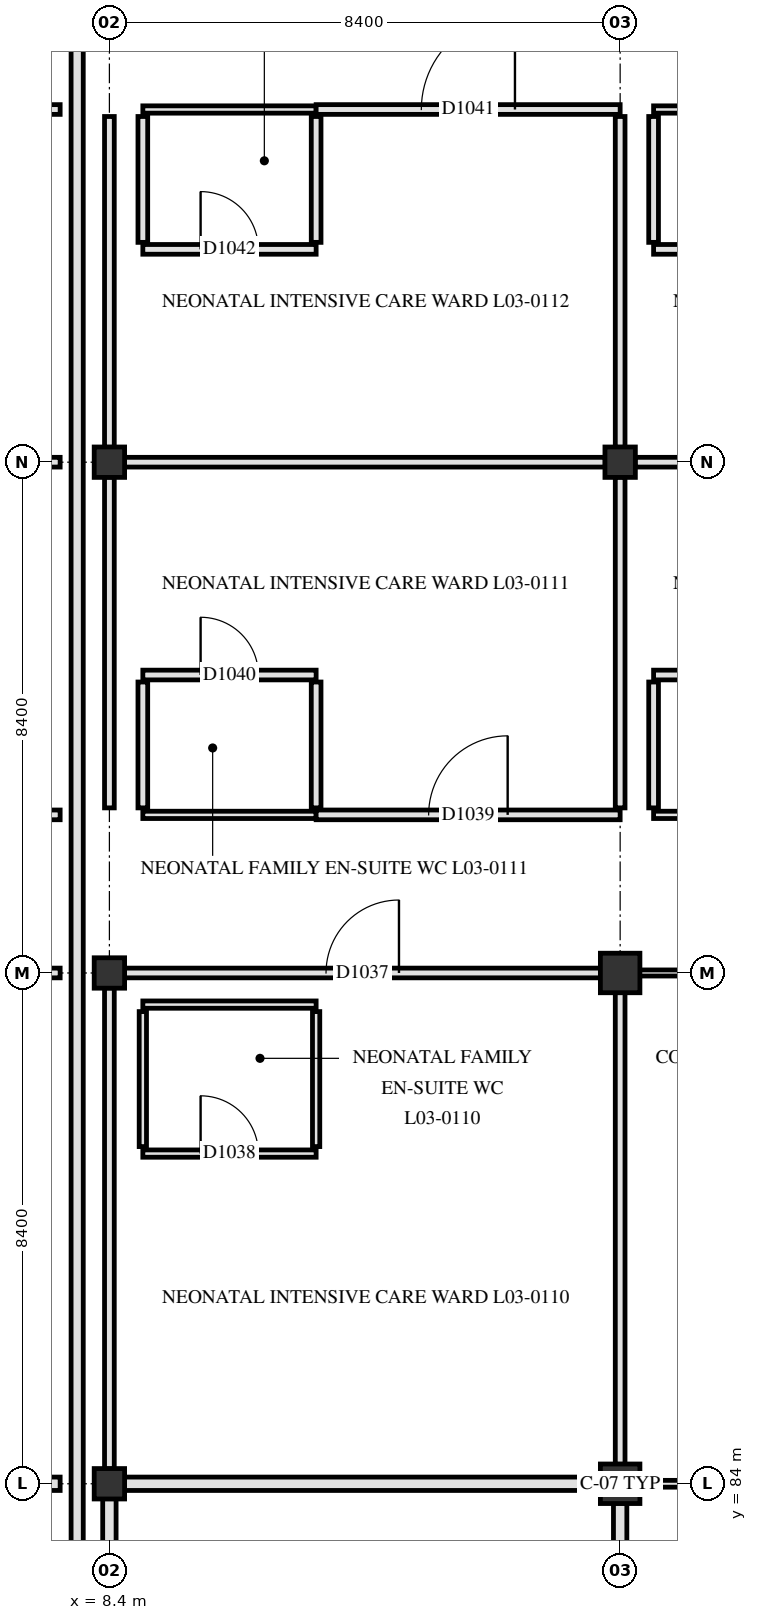
"""IFC4 building model, lengths in metres.
Left out: names, types, materials, properties, quantities, classifications, styles, units other than length and angle.
Written with IfcOpenShell. Run it as: python <this file> out.ifc"""

import sys

from ifc_helpers import new_model, si_unit, direction, frame, frame_2d, origin, origin_2d, place, context, subcontext, project, spatial, rectangle, circle, extrude, element, fill, save


model = new_model("IFC4")
c1 = context("Model", 3, precision=1e-05, world=origin(), true_north=direction((0.0, 1.0)))
c2 = subcontext(c1, "Body", "Model", "MODEL_VIEW")
j1 = project(units=[si_unit("LENGTHUNIT", "METRE"), si_unit("PLANEANGLEUNIT", "RADIAN")], contexts=[c1])
p1 = place(None, origin())
s1 = spatial("IfcSite", under=j1, at=p1, CompositionType="ELEMENT")
p2 = place(p1, origin())
s2 = spatial("IfcBuilding", under=s1, at=p2, CompositionType="ELEMENT")
p3 = place(p2, frame((0.0, 0.0, 14.4)))
s3 = spatial("IfcBuildingStorey", under=s2, at=p3, CompositionType="ELEMENT", Elevation=14.4)
for number, where, z_axis, x_axis in (
    (1, (8.4, 84.0, 0.0), (0.0, 0.0, 1.0), (1.0, 0.0, 0.0)),
    (2, (8.4, 92.4, 0.0), (0.0, 0.0, 1.0), (1.0, 0.0, 0.0)),
    (3, (8.4, 100.8, 0.0), (0.0, 0.0, 1.0), (1.0, 0.0, 0.0)),
):
    element("IfcColumn", number, at=place(p3, frame(where, z_axis=z_axis, x_axis=x_axis)), inside=s3, PredefinedType="COLUMN", context=c2, shape_type="SweptSolid", body=[
        extrude(rectangle(XDim=0.5, YDim=0.5, at=origin_2d()), origin(), (0.0, 0.0, 1.0), 4.2),
    ])
for number, where, z_axis, x_axis in (
    (4, (16.8, 84.0, 0.0), (0.0, 0.0, 1.0), (1.0, 0.0, 0.0)),
    (5, (16.8, 92.4, 0.0), (0.0, 0.0, 1.0), (1.0, 0.0, 0.0)),
):
    element("IfcColumn", number, at=place(p3, frame(where, z_axis=z_axis, x_axis=x_axis)), inside=s3, PredefinedType="COLUMN", context=c2, shape_type="SweptSolid", body=[
        extrude(circle(Radius=0.325, at=origin_2d()), origin(), (0.0, 0.0, 1.0), 4.2),
    ])
p4 = place(p3, frame((16.8, 100.8, 0.0), z_axis=(0.0, 0.0, 1.0), x_axis=(1.0, 0.0, 0.0)))
e6 = element("IfcColumn", 6, at=p4, inside=s3, PredefinedType="COLUMN", context=c2, shape_type="SweptSolid", body=[
    extrude(rectangle(XDim=0.5, YDim=0.5, at=origin_2d()), origin(), (0.0, 0.0, 1.0), 4.2),
])
p5 = place(p3, frame((7.87, 109.2, 4.18), z_axis=(0.0, 0.0, 1.0), x_axis=(0.0, -1.0, 0.0)))
e7 = element("IfcWall", 7, at=p5, inside=s3, PredefinedType="PARAPET", context=c2, shape_type="SweptSolid", body=[
    extrude(rectangle(XDim=50.4, YDim=0.2, at=frame_2d((25.2, 0.0))), origin(), (0.0, 0.0, 1.0), 1.17),
])
p6 = place(p3, frame((0.39, 84.0, 0.0), z_axis=(0.0, 0.0, 1.0), x_axis=(1.0, 0.0, 0.0)))
e8 = element("IfcWall", 8, at=p6, inside=s3, PredefinedType="PARTITIONING", context=c2, shape_type="SweptSolid", body=[
    extrude(rectangle(XDim=7.2, YDim=0.22, at=frame_2d((3.6, 0.0))), origin(), (0.0, 0.0, 1.0), 3.29),
])
p7 = place(p3, frame((8.645, 84.0, 0.0), z_axis=(0.0, 0.0, 1.0), x_axis=(1.0, 0.0, 0.0)))
e9 = element("IfcWall", 9, at=p7, inside=s3, PredefinedType="PARTITIONING", context=c2, shape_type="SweptSolid", body=[
    extrude(rectangle(XDim=7.835, YDim=0.22, at=frame_2d((3.917, 0.0))), origin(), (0.0, 0.0, 1.0), 3.28),
])
p8 = place(p3, frame((17.12, 84.0, 0.0), z_axis=(0.0, 0.0, 1.0), x_axis=(1.0, 0.0, 0.0)))
e10 = element("IfcWall", 10, at=p8, inside=s3, PredefinedType="PARTITIONING", context=c2, shape_type="SweptSolid", body=[
    extrude(rectangle(XDim=1.38, YDim=0.112, at=frame_2d((0.69, 0.0))), origin(), (0.0, 0.0, 1.0), 3.89),
])
p9 = place(p3, frame((8.95, 89.43, 0.0), z_axis=(0.0, 0.0, 1.0), x_axis=(1.0, 0.0, 0.0)))
e11 = element("IfcWall", 11, at=p9, inside=s3, PredefinedType="PARTITIONING", context=c2, shape_type="SweptSolid", body=[
    extrude(rectangle(XDim=2.85, YDim=0.12, at=frame_2d((1.425, 0.0))), origin(), (0.0, 0.0, 1.0), 3.89),
])
p10 = place(p9, frame((0.95, 0.0, 0.0)))
e12 = element("IfcOpeningElement", 12, at=p10, cuts=e11, PredefinedType="OPENING", context=c2, shape_type="SweptSolid", body=[
    extrude(rectangle(XDim=0.95, YDim=2.1, at=frame_2d((0.475, 1.05))), frame((0.0, 0.07, 0.0), z_axis=(0.0, -1.0, 0.0), x_axis=(1.0, 0.0, 0.0)), (0.0, 0.0, 1.0), 0.14),
])
p11 = place(p3, frame((8.95, 91.88, 0.0), z_axis=(0.0, 0.0, 1.0), x_axis=(1.0, 0.0, 0.0)))
e13 = element("IfcWall", 13, at=p11, inside=s3, PredefinedType="PARTITIONING", context=c2, shape_type="SweptSolid", body=[
    extrude(rectangle(XDim=2.85, YDim=0.12, at=frame_2d((1.425, 0.0))), origin(), (0.0, 0.0, 1.0), 3.89),
])
p12 = place(p3, frame((0.383, 92.4, 0.0), z_axis=(0.0, 0.0, 1.0), x_axis=(1.0, 0.0, 0.0)))
e14 = element("IfcWall", 14, at=p12, inside=s3, PredefinedType="PARTITIONING", context=c2, shape_type="SweptSolid", body=[
    extrude(rectangle(XDim=7.208, YDim=0.16, at=frame_2d((3.604, 0.0))), origin(), (0.0, 0.0, 1.0), 3.29),
])
p13 = place(p12, frame((3.949, 0.0, 0.0)))
e15 = element("IfcOpeningElement", 15, at=p13, cuts=e14, PredefinedType="OPENING", context=c2, shape_type="SweptSolid", body=[
    extrude(rectangle(XDim=1.4, YDim=2.2, at=frame_2d((0.7, 1.1))), frame((0.0, 0.09, 0.0), z_axis=(0.0, -1.0, 0.0), x_axis=(1.0, 0.0, 0.0)), (0.0, 0.0, 1.0), 0.18),
])
p14 = place(p3, frame((8.645, 92.4, 0.0), z_axis=(0.0, 0.0, 1.0), x_axis=(1.0, 0.0, 0.0)))
e16 = element("IfcWall", 16, at=p14, inside=s3, PredefinedType="PARTITIONING", context=c2, shape_type="SweptSolid", body=[
    extrude(rectangle(XDim=7.835, YDim=0.16, at=frame_2d((3.917, 0.0))), origin(), (0.0, 0.0, 1.0), 3.28),
])
p15 = place(p14, frame((3.317, 0.0, 0.0)))
e17 = element("IfcOpeningElement", 17, at=p15, cuts=e16, PredefinedType="OPENING", context=c2, shape_type="SweptSolid", body=[
    extrude(rectangle(XDim=1.2, YDim=2.15, at=frame_2d((0.6, 1.075))), frame((0.0, 0.09, 0.0), z_axis=(0.0, -1.0, 0.0), x_axis=(1.0, 0.0, 0.0)), (0.0, 0.0, 1.0), 0.18),
])
p16 = place(p3, frame((17.12, 92.4, 0.0), z_axis=(0.0, 0.0, 1.0), x_axis=(1.0, 0.0, 0.0)))
e18 = element("IfcWall", 18, at=p16, inside=s3, PredefinedType="PARTITIONING", context=c2, shape_type="SweptSolid", body=[
    extrude(rectangle(XDim=7.76, YDim=0.1, at=frame_2d((3.88, 0.0))), origin(), (0.0, 0.0, 1.0), 3.28),
])
p17 = place(p16, frame((3.22, 0.0, 0.0)))
e19 = element("IfcOpeningElement", 19, at=p17, cuts=e18, PredefinedType="OPENING", context=c2, shape_type="SweptSolid", body=[
    extrude(rectangle(XDim=1.32, YDim=2.18, at=frame_2d((0.66, 1.09))), frame((0.0, 0.06, 0.0), z_axis=(0.0, -1.0, 0.0), x_axis=(1.0, 0.0, 0.0)), (0.0, 0.0, 1.0), 0.12),
])
p18 = place(p3, frame((3.4, 95.0, 0.0), z_axis=(0.0, 0.0, 1.0), x_axis=(1.0, 0.0, 0.0)))
e20 = element("IfcWall", 20, at=p18, inside=s3, PredefinedType="PARTITIONING", context=c2, shape_type="SweptSolid", body=[
    extrude(rectangle(XDim=4.19, YDim=0.16, at=frame_2d((2.095, 0.0))), origin(), (0.0, 0.0, 1.0), 3.89),
])
p19 = place(p18, frame((1.37, 0.0, 0.0)))
e21 = element("IfcOpeningElement", 21, at=p19, cuts=e20, PredefinedType="OPENING", context=c2, shape_type="SweptSolid", body=[
    extrude(rectangle(XDim=1.45, YDim=2.2, at=frame_2d((0.725, 1.1))), frame((0.0, 0.09, 0.0), z_axis=(0.0, -1.0, 0.0), x_axis=(1.0, 0.0, 0.0)), (0.0, 0.0, 1.0), 0.18),
])
p20 = place(p3, frame((8.95, 95.0, 0.0), z_axis=(0.0, 0.0, 1.0), x_axis=(1.0, 0.0, 0.0)))
e22 = element("IfcWall", 22, at=p20, inside=s3, PredefinedType="PARTITIONING", context=c2, shape_type="SweptSolid", body=[
    extrude(rectangle(XDim=2.85, YDim=0.12, at=frame_2d((1.425, 0.0))), origin(), (0.0, 0.0, 1.0), 3.89),
])
p21 = place(p3, frame((11.8, 95.0, 0.0), z_axis=(0.0, 0.0, 1.0), x_axis=(1.0, 0.0, 0.0)))
e23 = element("IfcWall", 23, at=p21, inside=s3, PredefinedType="PARTITIONING", context=c2, shape_type="SweptSolid", body=[
    extrude(rectangle(XDim=5.0, YDim=0.16, at=frame_2d((2.5, 0.0))), origin(), (0.0, 0.0, 1.0), 3.33),
])
p22 = place(p21, frame((1.85, 0.0, 0.0)))
e24 = element("IfcOpeningElement", 24, at=p22, cuts=e23, PredefinedType="OPENING", context=c2, shape_type="SweptSolid", body=[
    extrude(rectangle(XDim=1.3, YDim=2.2, at=frame_2d((0.65, 1.1))), frame((0.0, 0.09, 0.0), z_axis=(0.0, -1.0, 0.0), x_axis=(1.0, 0.0, 0.0)), (0.0, 0.0, 1.0), 0.18),
])
p23 = place(p3, frame((17.35, 95.0, 0.0), z_axis=(0.0, 0.0, 1.0), x_axis=(1.0, 0.0, 0.0)))
e25 = element("IfcWall", 25, at=p23, inside=s3, PredefinedType="PARTITIONING", context=c2, shape_type="SweptSolid", body=[
    extrude(rectangle(XDim=2.85, YDim=0.12, at=frame_2d((1.425, 0.0))), origin(), (0.0, 0.0, 1.0), 3.89),
])
p24 = place(p3, frame((8.95, 97.3, 0.0), z_axis=(0.0, 0.0, 1.0), x_axis=(1.0, 0.0, 0.0)))
e26 = element("IfcWall", 26, at=p24, inside=s3, PredefinedType="PARTITIONING", context=c2, shape_type="SweptSolid", body=[
    extrude(rectangle(XDim=2.85, YDim=0.16, at=frame_2d((1.425, 0.0))), origin(), (0.0, 0.0, 1.0), 3.89),
])
p25 = place(p24, frame((0.95, 0.0, 0.0)))
e27 = element("IfcOpeningElement", 27, at=p25, cuts=e26, PredefinedType="OPENING", context=c2, shape_type="SweptSolid", body=[
    extrude(rectangle(XDim=0.95, YDim=2.1, at=frame_2d((0.475, 1.05))), frame((0.0, 0.09, 0.0), z_axis=(0.0, -1.0, 0.0), x_axis=(1.0, 0.0, 0.0)), (0.0, 0.0, 1.0), 0.18),
])
p26 = place(p3, frame((17.35, 97.3, 0.0), z_axis=(0.0, 0.0, 1.0), x_axis=(1.0, 0.0, 0.0)))
e28 = element("IfcWall", 28, at=p26, inside=s3, PredefinedType="PARTITIONING", context=c2, shape_type="SweptSolid", body=[
    extrude(rectangle(XDim=2.85, YDim=0.16, at=frame_2d((1.425, 0.0))), origin(), (0.0, 0.0, 1.0), 3.89),
])
p27 = place(p26, frame((0.95, 0.0, 0.0)))
e29 = element("IfcOpeningElement", 29, at=p27, cuts=e28, PredefinedType="OPENING", context=c2, shape_type="SweptSolid", body=[
    extrude(rectangle(XDim=0.95, YDim=2.1, at=frame_2d((0.475, 1.05))), frame((0.0, 0.09, 0.0), z_axis=(0.0, -1.0, 0.0), x_axis=(1.0, 0.0, 0.0)), (0.0, 0.0, 1.0), 0.18),
])
p28 = place(p3, frame((0.39, 100.8, 0.0), z_axis=(0.0, 0.0, 1.0), x_axis=(1.0, 0.0, 0.0)))
e30 = element("IfcWall", 30, at=p28, inside=s3, PredefinedType="PARTITIONING", context=c2, shape_type="SweptSolid", body=[
    extrude(rectangle(XDim=7.2, YDim=0.16, at=frame_2d((3.6, 0.0))), origin(), (0.0, 0.0, 1.0), 3.29),
])
p29 = place(p3, frame((8.645, 100.8, 0.0), z_axis=(0.0, 0.0, 1.0), x_axis=(1.0, 0.0, 0.0)))
e31 = element("IfcWall", 31, at=p29, inside=s3, PredefinedType="PARTITIONING", context=c2, shape_type="SweptSolid", body=[
    extrude(rectangle(XDim=7.91, YDim=0.16, at=frame_2d((3.955, 0.0))), origin(), (0.0, 0.0, 1.0), 3.28),
])
p30 = place(p3, frame((17.045, 100.8, 0.0), z_axis=(0.0, 0.0, 1.0), x_axis=(1.0, 0.0, 0.0)))
e32 = element("IfcWall", 32, at=p30, inside=s3, PredefinedType="PARTITIONING", context=c2, shape_type="SweptSolid", body=[
    extrude(rectangle(XDim=7.91, YDim=0.16, at=frame_2d((3.955, 0.0))), origin(), (0.0, 0.0, 1.0), 3.28),
])
p31 = place(p3, frame((8.95, 104.3, 0.0), z_axis=(0.0, 0.0, 1.0), x_axis=(1.0, 0.0, 0.0)))
e33 = element("IfcWall", 33, at=p31, inside=s3, PredefinedType="PARTITIONING", context=c2, shape_type="SweptSolid", body=[
    extrude(rectangle(XDim=2.85, YDim=0.16, at=frame_2d((1.425, 0.0))), origin(), (0.0, 0.0, 1.0), 3.89),
])
p32 = place(p31, frame((0.95, 0.0, 0.0)))
e34 = element("IfcOpeningElement", 34, at=p32, cuts=e33, PredefinedType="OPENING", context=c2, shape_type="SweptSolid", body=[
    extrude(rectangle(XDim=0.95, YDim=2.1, at=frame_2d((0.475, 1.05))), frame((0.0, 0.09, 0.0), z_axis=(0.0, -1.0, 0.0), x_axis=(1.0, 0.0, 0.0)), (0.0, 0.0, 1.0), 0.18),
])
p33 = place(p3, frame((17.35, 104.3, 0.0), z_axis=(0.0, 0.0, 1.0), x_axis=(1.0, 0.0, 0.0)))
e35 = element("IfcWall", 35, at=p33, inside=s3, PredefinedType="PARTITIONING", context=c2, shape_type="SweptSolid", body=[
    extrude(rectangle(XDim=2.85, YDim=0.16, at=frame_2d((1.425, 0.0))), origin(), (0.0, 0.0, 1.0), 3.89),
])
p34 = place(p33, frame((0.95, 0.0, 0.0)))
e36 = element("IfcOpeningElement", 36, at=p34, cuts=e35, PredefinedType="OPENING", context=c2, shape_type="SweptSolid", body=[
    extrude(rectangle(XDim=0.95, YDim=2.1, at=frame_2d((0.475, 1.05))), frame((0.0, 0.09, 0.0), z_axis=(0.0, -1.0, 0.0), x_axis=(1.0, 0.0, 0.0)), (0.0, 0.0, 1.0), 0.18),
])
p35 = place(p3, frame((3.4, 106.6, 0.0), z_axis=(0.0, 0.0, 1.0), x_axis=(1.0, 0.0, 0.0)))
e37 = element("IfcWall", 37, at=p35, inside=s3, PredefinedType="PARTITIONING", context=c2, shape_type="SweptSolid", body=[
    extrude(rectangle(XDim=4.19, YDim=0.16, at=frame_2d((2.095, 0.0))), origin(), (0.0, 0.0, 1.0), 3.89),
])
p36 = place(p35, frame((1.195, 0.0, 0.0)))
e38 = element("IfcOpeningElement", 38, at=p36, cuts=e37, PredefinedType="OPENING", context=c2, shape_type="SweptSolid", body=[
    extrude(rectangle(XDim=1.8, YDim=2.25, at=frame_2d((0.9, 1.125))), frame((0.0, 0.09, 0.0), z_axis=(0.0, -1.0, 0.0), x_axis=(1.0, 0.0, 0.0)), (0.0, 0.0, 1.0), 0.18),
])
p37 = place(p3, frame((8.95, 106.6, 0.0), z_axis=(0.0, 0.0, 1.0), x_axis=(1.0, 0.0, 0.0)))
e39 = element("IfcWall", 39, at=p37, inside=s3, PredefinedType="PARTITIONING", context=c2, shape_type="SweptSolid", body=[
    extrude(rectangle(XDim=2.85, YDim=0.12, at=frame_2d((1.425, 0.0))), origin(), (0.0, 0.0, 1.0), 3.89),
])
p38 = place(p3, frame((11.8, 106.6, 0.0), z_axis=(0.0, 0.0, 1.0), x_axis=(1.0, 0.0, 0.0)))
e40 = element("IfcWall", 40, at=p38, inside=s3, PredefinedType="PARTITIONING", context=c2, shape_type="SweptSolid", body=[
    extrude(rectangle(XDim=5.0, YDim=0.16, at=frame_2d((2.5, 0.0))), origin(), (0.0, 0.0, 1.0), 3.33),
])
p39 = place(p38, frame((1.73, 0.0, 0.0)))
e41 = element("IfcOpeningElement", 41, at=p39, cuts=e40, PredefinedType="OPENING", context=c2, shape_type="SweptSolid", body=[
    extrude(rectangle(XDim=1.54, YDim=2.24, at=frame_2d((0.77, 1.12))), frame((0.0, 0.09, 0.0), z_axis=(0.0, -1.0, 0.0), x_axis=(1.0, 0.0, 0.0)), (0.0, 0.0, 1.0), 0.18),
])
p40 = place(p3, frame((17.35, 106.6, 0.0), z_axis=(0.0, 0.0, 1.0), x_axis=(1.0, 0.0, 0.0)))
e42 = element("IfcWall", 42, at=p40, inside=s3, PredefinedType="PARTITIONING", context=c2, shape_type="SweptSolid", body=[
    extrude(rectangle(XDim=2.85, YDim=0.12, at=frame_2d((1.425, 0.0))), origin(), (0.0, 0.0, 1.0), 3.89),
])
p41 = place(p3, frame((8.4, 78.315, 0.0), z_axis=(0.0, 0.0, 1.0), x_axis=(0.0, 1.0, 0.0)))
e43 = element("IfcWall", 43, at=p41, inside=s3, PredefinedType="PARTITIONING", context=c2, shape_type="SweptSolid", body=[
    extrude(rectangle(XDim=5.44, YDim=0.22, at=frame_2d((2.72, 0.0))), origin(), (0.0, 0.0, 1.0), 3.33),
])
p42 = place(p3, frame((8.4, 84.245, 0.0), z_axis=(0.0, 0.0, 1.0), x_axis=(0.0, 1.0, 0.0)))
e44 = element("IfcWall", 44, at=p42, inside=s3, PredefinedType="PARTITIONING", context=c2, shape_type="SweptSolid", body=[
    extrude(rectangle(XDim=7.91, YDim=0.16, at=frame_2d((3.955, 0.0))), origin(), (0.0, 0.0, 1.0), 3.33),
])
p43 = place(p3, frame((8.4, 95.115, 0.0), z_axis=(0.0, 0.0, 1.0), x_axis=(0.0, 1.0, 0.0)))
e45 = element("IfcWall", 45, at=p43, inside=s3, PredefinedType="PARTITIONING", context=c2, shape_type="SweptSolid", body=[
    extrude(rectangle(XDim=5.44, YDim=0.16, at=frame_2d((2.72, 0.0))), origin(), (0.0, 0.0, 1.0), 3.33),
])
p44 = place(p3, frame((8.4, 101.045, 0.0), z_axis=(0.0, 0.0, 1.0), x_axis=(0.0, 1.0, 0.0)))
e46 = element("IfcWall", 46, at=p44, inside=s3, PredefinedType="PARTITIONING", context=c2, shape_type="SweptSolid", body=[
    extrude(rectangle(XDim=5.44, YDim=0.16, at=frame_2d((2.72, 0.0))), origin(), (0.0, 0.0, 1.0), 3.33),
])
p45 = place(p3, frame((8.95, 89.545, 0.0), z_axis=(0.0, 0.0, 1.0), x_axis=(0.0, 1.0, 0.0)))
e47 = element("IfcWall", 47, at=p45, inside=s3, PredefinedType="PARTITIONING", context=c2, shape_type="SweptSolid", body=[
    extrude(rectangle(XDim=2.22, YDim=0.12, at=frame_2d((1.11, 0.0))), origin(), (0.0, 0.0, 1.0), 3.89),
])
for number, where, z_axis, x_axis in (
    (48, (8.95, 95.115, 0.0), (0.0, 0.0, 1.0), (0.0, 1.0, 0.0)),
    (49, (8.95, 104.415, 0.0), (0.0, 0.0, 1.0), (0.0, 1.0, 0.0)),
):
    element("IfcWall", number, at=place(p3, frame(where, z_axis=z_axis, x_axis=x_axis)), inside=s3, PredefinedType="PARTITIONING", context=c2, shape_type="SweptSolid", body=[
        extrude(rectangle(XDim=2.07, YDim=0.16, at=frame_2d((1.035, 0.0))), origin(), (0.0, 0.0, 1.0), 3.89),
    ])
p46 = place(p3, frame((11.8, 89.545, 0.0), z_axis=(0.0, 0.0, 1.0), x_axis=(0.0, 1.0, 0.0)))
e50 = element("IfcWall", 50, at=p46, inside=s3, PredefinedType="PARTITIONING", context=c2, shape_type="SweptSolid", body=[
    extrude(rectangle(XDim=2.22, YDim=0.12, at=frame_2d((1.11, 0.0))), origin(), (0.0, 0.0, 1.0), 3.89),
])
for number, where, z_axis, x_axis in (
    (51, (11.8, 95.115, 0.0), (0.0, 0.0, 1.0), (0.0, 1.0, 0.0)),
    (52, (11.8, 104.415, 0.0), (0.0, 0.0, 1.0), (0.0, 1.0, 0.0)),
):
    element("IfcWall", number, at=place(p3, frame(where, z_axis=z_axis, x_axis=x_axis)), inside=s3, PredefinedType="PARTITIONING", context=c2, shape_type="SweptSolid", body=[
        extrude(rectangle(XDim=2.07, YDim=0.16, at=frame_2d((1.035, 0.0))), origin(), (0.0, 0.0, 1.0), 3.89),
    ])
p47 = place(p3, frame((16.8, 78.315, 0.0), z_axis=(0.0, 0.0, 1.0), x_axis=(0.0, 1.0, 0.0)))
e53 = element("IfcWall", 53, at=p47, inside=s3, PredefinedType="PARTITIONING", context=c2, shape_type="SweptSolid", body=[
    extrude(rectangle(XDim=5.365, YDim=0.22, at=frame_2d((2.683, 0.0))), origin(), (0.0, 0.0, 1.0), 3.33),
])
p48 = place(p3, frame((16.8, 84.32, 0.0), z_axis=(0.0, 0.0, 1.0), x_axis=(0.0, 1.0, 0.0)))
e54 = element("IfcWall", 54, at=p48, inside=s3, PredefinedType="PARTITIONING", context=c2, shape_type="SweptSolid", body=[
    extrude(rectangle(XDim=7.76, YDim=0.16, at=frame_2d((3.88, 0.0))), origin(), (0.0, 0.0, 1.0), 3.33),
])
p49 = place(p3, frame((16.8, 95.115, 0.0), z_axis=(0.0, 0.0, 1.0), x_axis=(0.0, 1.0, 0.0)))
e55 = element("IfcWall", 55, at=p49, inside=s3, PredefinedType="PARTITIONING", context=c2, shape_type="SweptSolid", body=[
    extrude(rectangle(XDim=5.44, YDim=0.16, at=frame_2d((2.72, 0.0))), origin(), (0.0, 0.0, 1.0), 3.33),
])
p50 = place(p3, frame((16.8, 101.045, 0.0), z_axis=(0.0, 0.0, 1.0), x_axis=(0.0, 1.0, 0.0)))
e56 = element("IfcWall", 56, at=p50, inside=s3, PredefinedType="PARTITIONING", context=c2, shape_type="SweptSolid", body=[
    extrude(rectangle(XDim=5.44, YDim=0.16, at=frame_2d((2.72, 0.0))), origin(), (0.0, 0.0, 1.0), 3.33),
])
for number, where, z_axis, x_axis in (
    (57, (17.35, 95.115, 0.0), (0.0, 0.0, 1.0), (0.0, 1.0, 0.0)),
    (58, (17.35, 104.415, 0.0), (0.0, 0.0, 1.0), (0.0, 1.0, 0.0)),
):
    element("IfcWall", number, at=place(p3, frame(where, z_axis=z_axis, x_axis=x_axis)), inside=s3, PredefinedType="PARTITIONING", context=c2, shape_type="SweptSolid", body=[
        extrude(rectangle(XDim=2.07, YDim=0.16, at=frame_2d((1.035, 0.0))), origin(), (0.0, 0.0, 1.0), 3.89),
    ])
p51 = place(p15, origin())
e59 = element("IfcDoor", 59, at=p51, inside=s3, OperationType="SINGLE_SWING_RIGHT", PredefinedType="DOOR", context=c2, shape_type="SweptSolid", body=[
    extrude(rectangle(XDim=1.2, YDim=2.15, at=frame_2d((0.6, 1.075))), frame((0.0, 0.025, 0.0), z_axis=(0.0, -1.0, 0.0), x_axis=(1.0, 0.0, 0.0)), (0.0, 0.0, 1.0), 0.05),
])
fill(e17, e59)
p52 = place(p10, origin())
e60 = element("IfcDoor", 60, at=p52, inside=s3, OperationType="SINGLE_SWING_LEFT", PredefinedType="DOOR", context=c2, shape_type="SweptSolid", body=[
    extrude(rectangle(XDim=0.95, YDim=2.1, at=frame_2d((0.475, 1.05))), frame((0.0, 0.025, 0.0), z_axis=(0.0, -1.0, 0.0), x_axis=(1.0, 0.0, 0.0)), (0.0, 0.0, 1.0), 0.05),
])
fill(e12, e60)
p53 = place(p22, origin())
e61 = element("IfcDoor", 61, at=p53, inside=s3, OperationType="SINGLE_SWING_RIGHT", PredefinedType="DOOR", context=c2, shape_type="SweptSolid", body=[
    extrude(rectangle(XDim=1.3, YDim=2.2, at=frame_2d((0.65, 1.1))), frame((0.0, 0.025, 0.0), z_axis=(0.0, -1.0, 0.0), x_axis=(1.0, 0.0, 0.0)), (0.0, 0.0, 1.0), 0.05),
])
fill(e24, e61)
p54 = place(p25, origin())
e62 = element("IfcDoor", 62, at=p54, inside=s3, OperationType="SINGLE_SWING_LEFT", PredefinedType="DOOR", context=c2, shape_type="SweptSolid", body=[
    extrude(rectangle(XDim=0.95, YDim=2.1, at=frame_2d((0.475, 1.05))), frame((0.0, 0.025, 0.0), z_axis=(0.0, -1.0, 0.0), x_axis=(1.0, 0.0, 0.0)), (0.0, 0.0, 1.0), 0.05),
])
fill(e27, e62)
p55 = place(p39, origin())
e63 = element("IfcDoor", 63, at=p55, inside=s3, OperationType="SINGLE_SWING_RIGHT", PredefinedType="DOOR", context=c2, shape_type="SweptSolid", body=[
    extrude(rectangle(XDim=1.54, YDim=2.24, at=frame_2d((0.77, 1.12))), frame((0.0, 0.025, 0.0), z_axis=(0.0, -1.0, 0.0), x_axis=(1.0, 0.0, 0.0)), (0.0, 0.0, 1.0), 0.05),
])
fill(e41, e63)
p56 = place(p32, origin())
e64 = element("IfcDoor", 64, at=p56, inside=s3, OperationType="SINGLE_SWING_LEFT", PredefinedType="DOOR", context=c2, shape_type="SweptSolid", body=[
    extrude(rectangle(XDim=0.95, YDim=2.1, at=frame_2d((0.475, 1.05))), frame((0.0, 0.025, 0.0), z_axis=(0.0, -1.0, 0.0), x_axis=(1.0, 0.0, 0.0)), (0.0, 0.0, 1.0), 0.05),
])
fill(e34, e64)
save(model, sys.argv[1])
